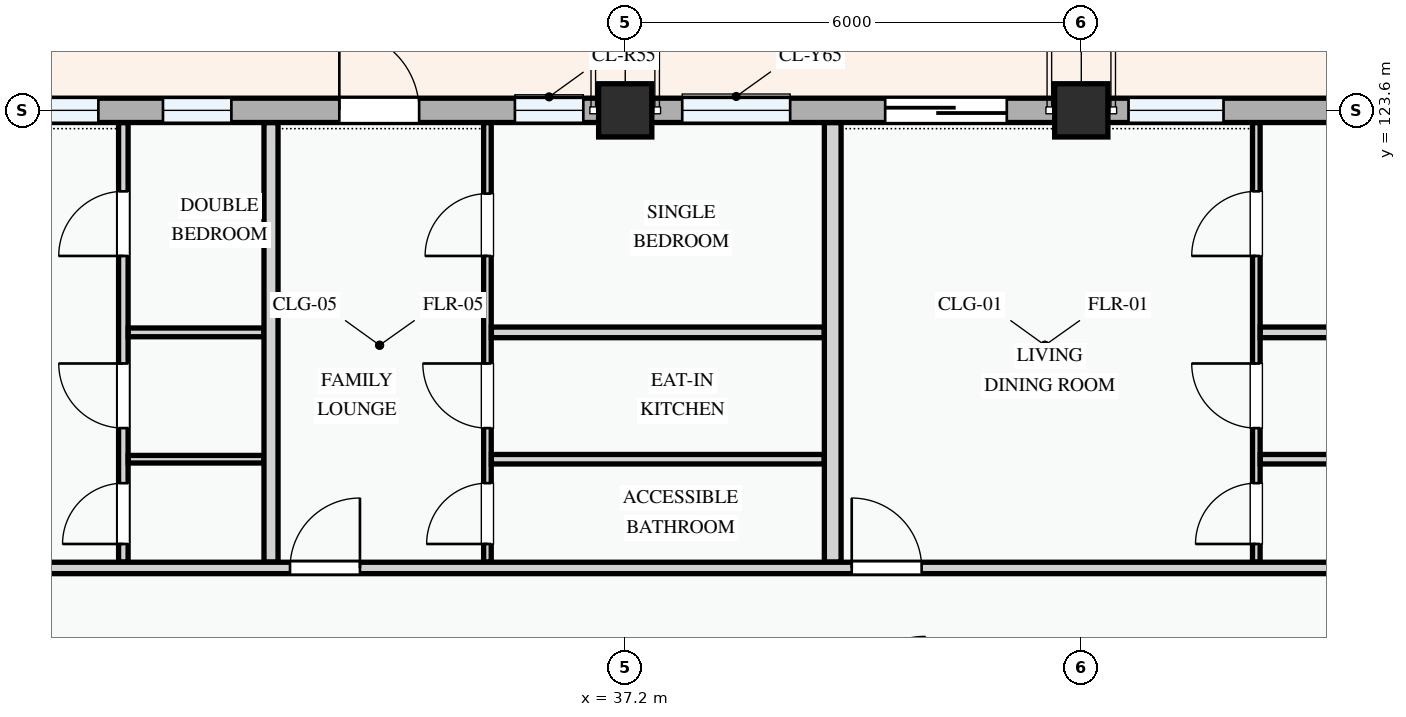
"""IFC4 building model, lengths in metres.
Left out: names, types, materials, properties, quantities, classifications, styles, units other than length and angle.
Written with IfcOpenShell. Run it as: python <this file> out.ifc"""

import sys

from ifc_helpers import new_model, si_unit, direction, frame, frame_2d, origin, origin_2d, place, context, subcontext, project, spatial, rectangle, extrude, element, fill, save


model = new_model("IFC4")
c1 = context("Model", 3, precision=1e-05, world=origin(), true_north=direction((0.0, 1.0)))
c2 = subcontext(c1, "Body", "Model", "MODEL_VIEW")
j1 = project(units=[si_unit("LENGTHUNIT", "METRE"), si_unit("PLANEANGLEUNIT", "RADIAN")], contexts=[c1])
p1 = place(None, origin())
s1 = spatial("IfcSite", under=j1, at=p1, CompositionType="ELEMENT")
p2 = place(p1, origin())
s2 = spatial("IfcBuilding", under=s1, at=p2, CompositionType="ELEMENT")
p3 = place(p2, frame((0.0, 0.0, 21.3)))
s3 = spatial("IfcBuildingStorey", under=s2, at=p3, CompositionType="ELEMENT", Elevation=21.3)
for number, where, z_axis, x_axis in (
    (1, (37.2, 123.6, 0.0), (0.0, 0.0, 1.0), (1.0, 0.0, 0.0)),
    (2, (43.2, 123.6, 0.0), (0.0, 0.0, 1.0), (1.0, 0.0, 0.0)),
):
    element("IfcColumn", number, at=place(p3, frame(where, z_axis=z_axis, x_axis=x_axis)), inside=s3, PredefinedType="COLUMN", context=c2, shape_type="SweptSolid", body=[
        extrude(rectangle(XDim=0.7, YDim=0.7, at=origin_2d()), origin(), (0.0, 0.0, 1.0), 3.3),
    ])
p4 = place(p3, frame((51.6, 123.6, 0.0), z_axis=(0.0, 0.0, 1.0), x_axis=(-1.0, 0.0, 0.0)))
e3 = element("IfcWall", 3, at=p4, inside=s3, PredefinedType="STANDARD", context=c2, shape_type="SweptSolid", body=[
    extrude(rectangle(XDim=8.4, YDim=0.32, at=frame_2d((4.2, 0.0))), origin(), (0.0, 0.0, 1.0), 2.345),
])
p5 = place(p4, frame((0.62, 0.0, 0.0)))
e4 = element("IfcOpeningElement", 4, at=p5, cuts=e3, PredefinedType="OPENING", context=c2, shape_type="SweptSolid", body=[
    extrude(rectangle(XDim=1.5, YDim=2.2, at=frame_2d((0.75, 1.1))), frame((0.0, 0.17, 0.0), z_axis=(0.0, -1.0, 0.0), x_axis=(1.0, 0.0, 0.0)), (0.0, 0.0, 1.0), 0.34),
])
p6 = place(p4, frame((3.259, 0.0, 0.78)))
e5 = element("IfcOpeningElement", 5, at=p6, cuts=e3, PredefinedType="OPENING", context=c2, shape_type="SweptSolid", body=[
    extrude(rectangle(XDim=1.75, YDim=1.45, at=frame_2d((0.875, 0.725))), frame((0.0, 0.17, 0.0), z_axis=(0.0, -1.0, 0.0), x_axis=(1.0, 0.0, 0.0)), (0.0, 0.0, 1.0), 0.34),
])
p7 = place(p4, frame((6.529, 0.0, 0.78)))
e6 = element("IfcOpeningElement", 6, at=p7, cuts=e3, PredefinedType="OPENING", context=c2, shape_type="SweptSolid", body=[
    extrude(rectangle(XDim=1.25, YDim=1.45, at=frame_2d((0.625, 0.725))), frame((0.0, 0.17, 0.0), z_axis=(0.0, -1.0, 0.0), x_axis=(1.0, 0.0, 0.0)), (0.0, 0.0, 1.0), 0.34),
])
p8 = place(p3, frame((43.2, 123.6, 0.0), z_axis=(0.0, 0.0, 1.0), x_axis=(-1.0, 0.0, 0.0)))
e7 = element("IfcWall", 7, at=p8, inside=s3, PredefinedType="STANDARD", context=c2, shape_type="SweptSolid", body=[
    extrude(rectangle(XDim=6.0, YDim=0.32, at=frame_2d((3.0, 0.0))), origin(), (0.0, 0.0, 1.0), 2.445),
])
p9 = place(p8, frame((0.98, 0.0, 0.0)))
e8 = element("IfcOpeningElement", 8, at=p9, cuts=e7, PredefinedType="OPENING", context=c2, shape_type="SweptSolid", body=[
    extrude(rectangle(XDim=1.6, YDim=2.2, at=frame_2d((0.8, 1.1))), frame((0.0, 0.17, 0.0), z_axis=(0.0, -1.0, 0.0), x_axis=(1.0, 0.0, 0.0)), (0.0, 0.0, 1.0), 0.34),
])
p10 = place(p8, frame((3.83, 0.0, 0.78)))
e9 = element("IfcOpeningElement", 9, at=p10, cuts=e7, PredefinedType="OPENING", context=c2, shape_type="SweptSolid", body=[
    extrude(rectangle(XDim=1.42, YDim=1.38, at=frame_2d((0.71, 0.69))), frame((0.0, 0.17, 0.0), z_axis=(0.0, -1.0, 0.0), x_axis=(1.0, 0.0, 0.0)), (0.0, 0.0, 1.0), 0.34),
])
p11 = place(p3, frame((37.2, 123.6, 0.0), z_axis=(0.0, 0.0, 1.0), x_axis=(-1.0, 0.0, 0.0)))
e10 = element("IfcWall", 10, at=p11, inside=s3, PredefinedType="STANDARD", context=c2, shape_type="SweptSolid", body=[
    extrude(rectangle(XDim=8.4, YDim=0.32, at=frame_2d((4.2, 0.0))), origin(), (0.0, 0.0, 1.0), 2.345),
])
p12 = place(p11, frame((2.711, 0.0, 0.0)))
e11 = element("IfcOpeningElement", 11, at=p12, cuts=e10, PredefinedType="OPENING", context=c2, shape_type="SweptSolid", body=[
    extrude(rectangle(XDim=1.05, YDim=2.15, at=frame_2d((0.525, 1.075))), frame((0.0, 0.17, 0.0), z_axis=(0.0, -1.0, 0.0), x_axis=(1.0, 0.0, 0.0)), (0.0, 0.0, 1.0), 0.34),
])
p13 = place(p11, frame((0.552, 0.0, 0.78)))
e12 = element("IfcOpeningElement", 12, at=p13, cuts=e10, PredefinedType="OPENING", context=c2, shape_type="SweptSolid", body=[
    extrude(rectangle(XDim=0.9, YDim=1.2, at=frame_2d((0.45, 0.6))), frame((0.0, 0.17, 0.0), z_axis=(0.0, -1.0, 0.0), x_axis=(1.0, 0.0, 0.0)), (0.0, 0.0, 1.0), 0.34),
])
p14 = place(p11, frame((5.181, 0.0, 0.78)))
e13 = element("IfcOpeningElement", 13, at=p14, cuts=e10, PredefinedType="OPENING", context=c2, shape_type="SweptSolid", body=[
    extrude(rectangle(XDim=0.9, YDim=1.2, at=frame_2d((0.45, 0.6))), frame((0.0, 0.17, 0.0), z_axis=(0.0, -1.0, 0.0), x_axis=(1.0, 0.0, 0.0)), (0.0, 0.0, 1.0), 0.34),
])
p15 = place(p11, frame((6.931, 0.0, 0.78)))
e14 = element("IfcOpeningElement", 14, at=p15, cuts=e10, PredefinedType="OPENING", context=c2, shape_type="SweptSolid", body=[
    extrude(rectangle(XDim=0.95, YDim=1.15, at=frame_2d((0.475, 0.575))), frame((0.0, 0.17, 0.0), z_axis=(0.0, -1.0, 0.0), x_axis=(1.0, 0.0, 0.0)), (0.0, 0.0, 1.0), 0.34),
])
p16 = place(p3, frame((30.597, 117.657, 0.0), z_axis=(0.0, 0.0, 1.0), x_axis=(0.0, 1.0, 0.0)))
e15 = element("IfcWall", 15, at=p16, inside=s3, PredefinedType="PARTITIONING", context=c2, shape_type="SweptSolid", body=[
    extrude(rectangle(XDim=5.781, YDim=0.125, at=frame_2d((2.891, 0.0))), origin(), (0.0, 0.0, 1.0), 3.0),
])
p17 = place(p16, frame((0.238, 0.0, 0.0)))
e16 = element("IfcOpeningElement", 16, at=p17, cuts=e15, PredefinedType="OPENING", context=c2, shape_type="SweptSolid", body=[
    extrude(rectangle(XDim=0.8, YDim=2.1, at=frame_2d((0.4, 1.05))), frame((0.0, 0.073, 0.0), z_axis=(0.0, -1.0, 0.0), x_axis=(1.0, 0.0, 0.0)), (0.0, 0.0, 1.0), 0.145),
])
p18 = place(p16, frame((1.763, 0.0, 0.0)))
e17 = element("IfcOpeningElement", 17, at=p18, cuts=e15, PredefinedType="OPENING", context=c2, shape_type="SweptSolid", body=[
    extrude(rectangle(XDim=0.85, YDim=2.1, at=frame_2d((0.425, 1.05))), frame((0.0, 0.073, 0.0), z_axis=(0.0, -1.0, 0.0), x_axis=(1.0, 0.0, 0.0)), (0.0, 0.0, 1.0), 0.145),
])
p19 = place(p16, frame((4.028, 0.0, 0.0)))
e18 = element("IfcOpeningElement", 18, at=p19, cuts=e15, PredefinedType="OPENING", context=c2, shape_type="SweptSolid", body=[
    extrude(rectangle(XDim=0.85, YDim=2.1, at=frame_2d((0.425, 1.05))), frame((0.0, 0.073, 0.0), z_axis=(0.0, -1.0, 0.0), x_axis=(1.0, 0.0, 0.0)), (0.0, 0.0, 1.0), 0.145),
])
p20 = place(p3, frame((30.662, 120.679, 0.0), z_axis=(0.0, 0.0, 1.0), x_axis=(1.0, 0.0, 0.0)))
e19 = element("IfcWall", 19, at=p20, inside=s3, PredefinedType="PARTITIONING", context=c2, shape_type="SweptSolid", body=[
    extrude(rectangle(XDim=1.784, YDim=0.115, at=frame_2d((0.892, 0.0))), origin(), (0.0, 0.0, 1.0), 3.0),
])
p21 = place(p3, frame((30.662, 119.01, 0.0), z_axis=(0.0, 0.0, 1.0), x_axis=(1.0, 0.0, 0.0)))
e20 = element("IfcWall", 20, at=p21, inside=s3, PredefinedType="PARTITIONING", context=c2, shape_type="SweptSolid", body=[
    extrude(rectangle(XDim=1.784, YDim=0.1, at=frame_2d((0.892, 0.0))), origin(), (0.0, 0.0, 1.0), 3.0),
])
p22 = place(p3, frame((35.387, 117.657, 0.0), z_axis=(0.0, 0.0, 1.0), x_axis=(0.0, 1.0, 0.0)))
e21 = element("IfcWall", 21, at=p22, inside=s3, PredefinedType="PARTITIONING", context=c2, shape_type="SweptSolid", body=[
    extrude(rectangle(XDim=5.781, YDim=0.1, at=frame_2d((2.891, 0.0))), origin(), (0.0, 0.0, 1.0), 3.0),
])
p23 = place(p22, frame((0.238, 0.0, 0.0)))
e22 = element("IfcOpeningElement", 22, at=p23, cuts=e21, PredefinedType="OPENING", context=c2, shape_type="SweptSolid", body=[
    extrude(rectangle(XDim=0.8, YDim=2.1, at=frame_2d((0.4, 1.05))), frame((0.0, 0.06, 0.0), z_axis=(0.0, -1.0, 0.0), x_axis=(1.0, 0.0, 0.0)), (0.0, 0.0, 1.0), 0.12),
])
p24 = place(p22, frame((1.763, 0.0, 0.0)))
e23 = element("IfcOpeningElement", 23, at=p24, cuts=e21, PredefinedType="OPENING", context=c2, shape_type="SweptSolid", body=[
    extrude(rectangle(XDim=0.85, YDim=2.1, at=frame_2d((0.425, 1.05))), frame((0.0, 0.06, 0.0), z_axis=(0.0, -1.0, 0.0), x_axis=(1.0, 0.0, 0.0)), (0.0, 0.0, 1.0), 0.12),
])
p25 = place(p22, frame((4.028, 0.0, 0.0)))
e24 = element("IfcOpeningElement", 24, at=p25, cuts=e21, PredefinedType="OPENING", context=c2, shape_type="SweptSolid", body=[
    extrude(rectangle(XDim=0.82, YDim=2.08, at=frame_2d((0.41, 1.04))), frame((0.0, 0.06, 0.0), z_axis=(0.0, -1.0, 0.0), x_axis=(1.0, 0.0, 0.0)), (0.0, 0.0, 1.0), 0.12),
])
p26 = place(p3, frame((35.439, 120.679, 0.0), z_axis=(0.0, 0.0, 1.0), x_axis=(1.0, 0.0, 0.0)))
e25 = element("IfcWall", 25, at=p26, inside=s3, PredefinedType="PARTITIONING", context=c2, shape_type="SweptSolid", body=[
    extrude(rectangle(XDim=4.379, YDim=0.14, at=frame_2d((2.189, 0.0))), origin(), (0.0, 0.0, 1.0), 3.0),
])
p27 = place(p3, frame((35.439, 119.01, 0.0), z_axis=(0.0, 0.0, 1.0), x_axis=(1.0, 0.0, 0.0)))
e26 = element("IfcWall", 26, at=p27, inside=s3, PredefinedType="PARTITIONING", context=c2, shape_type="SweptSolid", body=[
    extrude(rectangle(XDim=4.379, YDim=0.125, at=frame_2d((2.189, 0.0))), origin(), (0.0, 0.0, 1.0), 3.0),
])
p28 = place(p3, frame((32.54, 117.657, 0.0), z_axis=(0.0, 0.0, 1.0), x_axis=(0.0, 1.0, 0.0)))
e27 = element("IfcWall", 27, at=p28, inside=s3, PredefinedType="PARTITIONING", context=c2, shape_type="SweptSolid", body=[
    extrude(rectangle(XDim=5.781, YDim=0.185, at=frame_2d((2.891, 0.0))), origin(), (0.0, 0.0, 1.0), 3.0),
])
p29 = place(p3, frame((45.503, 117.657, 0.0), z_axis=(0.0, 0.0, 1.0), x_axis=(0.0, 1.0, 0.0)))
e28 = element("IfcWall", 28, at=p29, inside=s3, PredefinedType="PARTITIONING", context=c2, shape_type="SweptSolid", body=[
    extrude(rectangle(XDim=5.781, YDim=0.1, at=frame_2d((2.891, 0.0))), origin(), (0.0, 0.0, 1.0), 3.0),
])
p30 = place(p29, frame((0.238, 0.0, 0.0)))
e29 = element("IfcOpeningElement", 29, at=p30, cuts=e28, PredefinedType="OPENING", context=c2, shape_type="SweptSolid", body=[
    extrude(rectangle(XDim=0.8, YDim=2.1, at=frame_2d((0.4, 1.05))), frame((0.0, 0.06, 0.0), z_axis=(0.0, -1.0, 0.0), x_axis=(1.0, 0.0, 0.0)), (0.0, 0.0, 1.0), 0.12),
])
p31 = place(p29, frame((1.763, 0.0, 0.0)))
e30 = element("IfcOpeningElement", 30, at=p31, cuts=e28, PredefinedType="OPENING", context=c2, shape_type="SweptSolid", body=[
    extrude(rectangle(XDim=0.85, YDim=2.1, at=frame_2d((0.425, 1.05))), frame((0.0, 0.06, 0.0), z_axis=(0.0, -1.0, 0.0), x_axis=(1.0, 0.0, 0.0)), (0.0, 0.0, 1.0), 0.12),
])
p32 = place(p29, frame((4.028, 0.0, 0.0)))
e31 = element("IfcOpeningElement", 31, at=p32, cuts=e28, PredefinedType="OPENING", context=c2, shape_type="SweptSolid", body=[
    extrude(rectangle(XDim=0.85, YDim=2.1, at=frame_2d((0.425, 1.05))), frame((0.0, 0.06, 0.0), z_axis=(0.0, -1.0, 0.0), x_axis=(1.0, 0.0, 0.0)), (0.0, 0.0, 1.0), 0.12),
])
p33 = place(p3, frame((45.555, 120.679, 0.0), z_axis=(0.0, 0.0, 1.0), x_axis=(1.0, 0.0, 0.0)))
e32 = element("IfcWall", 32, at=p33, inside=s3, PredefinedType="PARTITIONING", context=c2, shape_type="SweptSolid", body=[
    extrude(rectangle(XDim=5.883, YDim=0.14, at=frame_2d((2.942, 0.0))), origin(), (0.0, 0.0, 1.0), 3.0),
])
p34 = place(p3, frame((45.555, 119.01, 0.0), z_axis=(0.0, 0.0, 1.0), x_axis=(1.0, 0.0, 0.0)))
e33 = element("IfcWall", 33, at=p34, inside=s3, PredefinedType="PARTITIONING", context=c2, shape_type="SweptSolid", body=[
    extrude(rectangle(XDim=5.883, YDim=0.125, at=frame_2d((2.942, 0.0))), origin(), (0.0, 0.0, 1.0), 3.0),
])
p35 = place(p3, frame((39.93, 117.657, 0.0), z_axis=(0.0, 0.0, 1.0), x_axis=(0.0, 1.0, 0.0)))
e34 = element("IfcWall", 34, at=p35, inside=s3, PredefinedType="PARTITIONING", context=c2, shape_type="SweptSolid", body=[
    extrude(rectangle(XDim=5.781, YDim=0.22, at=frame_2d((2.891, 0.0))), origin(), (0.0, 0.0, 1.0), 3.0),
])
p36 = place(p3, frame((22.66, 117.58, 0.0), z_axis=(0.0, 0.0, 1.0), x_axis=(1.0, 0.0, 0.0)))
e35 = element("IfcWall", 35, at=p36, inside=s3, PredefinedType="PARTITIONING", context=c2, shape_type="SweptSolid", body=[
    extrude(rectangle(XDim=28.778, YDim=0.15, at=frame_2d((14.389, 0.0))), origin(), (0.0, 0.0, 1.0), 3.0),
])
p37 = place(p36, frame((2.74, 0.0, 0.0)))
e36 = element("IfcOpeningElement", 36, at=p37, cuts=e35, PredefinedType="OPENING", context=c2, shape_type="SweptSolid", body=[
    extrude(rectangle(XDim=0.92, YDim=2.1, at=frame_2d((0.46, 1.05))), frame((0.0, 0.085, 0.0), z_axis=(0.0, -1.0, 0.0), x_axis=(1.0, 0.0, 0.0)), (0.0, 0.0, 1.0), 0.17),
])
p38 = place(p36, frame((10.13, 0.0, 0.0)))
e37 = element("IfcOpeningElement", 37, at=p38, cuts=e35, PredefinedType="OPENING", context=c2, shape_type="SweptSolid", body=[
    extrude(rectangle(XDim=0.92, YDim=2.1, at=frame_2d((0.46, 1.05))), frame((0.0, 0.085, 0.0), z_axis=(0.0, -1.0, 0.0), x_axis=(1.0, 0.0, 0.0)), (0.0, 0.0, 1.0), 0.17),
])
p39 = place(p36, frame((17.52, 0.0, 0.0)))
e38 = element("IfcOpeningElement", 38, at=p39, cuts=e35, PredefinedType="OPENING", context=c2, shape_type="SweptSolid", body=[
    extrude(rectangle(XDim=0.92, YDim=2.1, at=frame_2d((0.46, 1.05))), frame((0.0, 0.085, 0.0), z_axis=(0.0, -1.0, 0.0), x_axis=(1.0, 0.0, 0.0)), (0.0, 0.0, 1.0), 0.17),
])
p40 = place(p7, origin())
e39 = element("IfcWindow", 39, at=p40, inside=s3, PartitioningType="SINGLE_PANEL", PredefinedType="WINDOW", context=c2, shape_type="SweptSolid", body=[
    extrude(rectangle(XDim=1.25, YDim=1.45, at=frame_2d((0.625, 0.725))), frame((0.0, 0.03, 0.0), z_axis=(0.0, -1.0, 0.0), x_axis=(1.0, 0.0, 0.0)), (0.0, 0.0, 1.0), 0.06),
])
fill(e6, e39)
p41 = place(p9, frame((1.6, 0.0, 0.0), z_axis=(0.0, 0.0, 1.0), x_axis=(-1.0, 0.0, 0.0)))
e40 = element("IfcDoor", 40, at=p41, inside=s3, OperationType="SLIDING_TO_LEFT", PredefinedType="DOOR", context=c2, shape_type="SweptSolid", body=[
    extrude(rectangle(XDim=1.6, YDim=2.2, at=frame_2d((0.8, 1.1))), frame((0.0, 0.025, 0.0), z_axis=(0.0, -1.0, 0.0), x_axis=(1.0, 0.0, 0.0)), (0.0, 0.0, 1.0), 0.05),
])
fill(e8, e40)
p42 = place(p10, origin())
e41 = element("IfcWindow", 41, at=p42, inside=s3, PartitioningType="SINGLE_PANEL", PredefinedType="WINDOW", context=c2, shape_type="SweptSolid", body=[
    extrude(rectangle(XDim=1.42, YDim=1.38, at=frame_2d((0.71, 0.69))), frame((0.0, 0.03, 0.0), z_axis=(0.0, -1.0, 0.0), x_axis=(1.0, 0.0, 0.0)), (0.0, 0.0, 1.0), 0.06),
])
fill(e9, e41)
p43 = place(p12, frame((1.05, 0.0, 0.0), z_axis=(0.0, 0.0, 1.0), x_axis=(-1.0, 0.0, 0.0)))
e42 = element("IfcDoor", 42, at=p43, inside=s3, OperationType="SINGLE_SWING_LEFT", PredefinedType="DOOR", context=c2, shape_type="SweptSolid", body=[
    extrude(rectangle(XDim=1.05, YDim=2.15, at=frame_2d((0.525, 1.075))), frame((0.0, 0.025, 0.0), z_axis=(0.0, -1.0, 0.0), x_axis=(1.0, 0.0, 0.0)), (0.0, 0.0, 1.0), 0.05),
])
fill(e11, e42)
p44 = place(p13, origin())
e43 = element("IfcWindow", 43, at=p44, inside=s3, PartitioningType="SINGLE_PANEL", PredefinedType="WINDOW", context=c2, shape_type="SweptSolid", body=[
    extrude(rectangle(XDim=0.9, YDim=1.2, at=frame_2d((0.45, 0.6))), frame((0.0, 0.03, 0.0), z_axis=(0.0, -1.0, 0.0), x_axis=(1.0, 0.0, 0.0)), (0.0, 0.0, 1.0), 0.06),
])
fill(e12, e43)
p45 = place(p14, origin())
e44 = element("IfcWindow", 44, at=p45, inside=s3, PartitioningType="SINGLE_PANEL", PredefinedType="WINDOW", context=c2, shape_type="SweptSolid", body=[
    extrude(rectangle(XDim=0.9, YDim=1.2, at=frame_2d((0.45, 0.6))), frame((0.0, 0.03, 0.0), z_axis=(0.0, -1.0, 0.0), x_axis=(1.0, 0.0, 0.0)), (0.0, 0.0, 1.0), 0.06),
])
fill(e13, e44)
p46 = place(p15, origin())
e45 = element("IfcWindow", 45, at=p46, inside=s3, PartitioningType="SINGLE_PANEL", PredefinedType="WINDOW", context=c2, shape_type="SweptSolid", body=[
    extrude(rectangle(XDim=0.95, YDim=1.15, at=frame_2d((0.475, 0.575))), frame((0.0, 0.03, 0.0), z_axis=(0.0, -1.0, 0.0), x_axis=(1.0, 0.0, 0.0)), (0.0, 0.0, 1.0), 0.06),
])
fill(e14, e45)
p47 = place(p17, origin())
e46 = element("IfcDoor", 46, at=p47, inside=s3, OperationType="SINGLE_SWING_LEFT", PredefinedType="DOOR", context=c2, shape_type="SweptSolid", body=[
    extrude(rectangle(XDim=0.8, YDim=2.1, at=frame_2d((0.4, 1.05))), frame((0.0, 0.025, 0.0), z_axis=(0.0, -1.0, 0.0), x_axis=(1.0, 0.0, 0.0)), (0.0, 0.0, 1.0), 0.05),
])
fill(e16, e46)
p48 = place(p18, origin())
e47 = element("IfcDoor", 47, at=p48, inside=s3, OperationType="SINGLE_SWING_RIGHT", PredefinedType="DOOR", context=c2, shape_type="SweptSolid", body=[
    extrude(rectangle(XDim=0.85, YDim=2.1, at=frame_2d((0.425, 1.05))), frame((0.0, 0.025, 0.0), z_axis=(0.0, -1.0, 0.0), x_axis=(1.0, 0.0, 0.0)), (0.0, 0.0, 1.0), 0.05),
])
fill(e17, e47)
p49 = place(p19, origin())
e48 = element("IfcDoor", 48, at=p49, inside=s3, OperationType="SINGLE_SWING_LEFT", PredefinedType="DOOR", context=c2, shape_type="SweptSolid", body=[
    extrude(rectangle(XDim=0.85, YDim=2.1, at=frame_2d((0.425, 1.05))), frame((0.0, 0.025, 0.0), z_axis=(0.0, -1.0, 0.0), x_axis=(1.0, 0.0, 0.0)), (0.0, 0.0, 1.0), 0.05),
])
fill(e18, e48)
p50 = place(p23, origin())
e49 = element("IfcDoor", 49, at=p50, inside=s3, OperationType="SINGLE_SWING_LEFT", PredefinedType="DOOR", context=c2, shape_type="SweptSolid", body=[
    extrude(rectangle(XDim=0.8, YDim=2.1, at=frame_2d((0.4, 1.05))), frame((0.0, 0.025, 0.0), z_axis=(0.0, -1.0, 0.0), x_axis=(1.0, 0.0, 0.0)), (0.0, 0.0, 1.0), 0.05),
])
fill(e22, e49)
p51 = place(p24, origin())
e50 = element("IfcDoor", 50, at=p51, inside=s3, OperationType="SINGLE_SWING_RIGHT", PredefinedType="DOOR", context=c2, shape_type="SweptSolid", body=[
    extrude(rectangle(XDim=0.85, YDim=2.1, at=frame_2d((0.425, 1.05))), frame((0.0, 0.025, 0.0), z_axis=(0.0, -1.0, 0.0), x_axis=(1.0, 0.0, 0.0)), (0.0, 0.0, 1.0), 0.05),
])
fill(e23, e50)
p52 = place(p25, origin())
e51 = element("IfcDoor", 51, at=p52, inside=s3, OperationType="SINGLE_SWING_LEFT", PredefinedType="DOOR", context=c2, shape_type="SweptSolid", body=[
    extrude(rectangle(XDim=0.82, YDim=2.08, at=frame_2d((0.41, 1.04))), frame((0.0, 0.025, 0.0), z_axis=(0.0, -1.0, 0.0), x_axis=(1.0, 0.0, 0.0)), (0.0, 0.0, 1.0), 0.05),
])
fill(e24, e51)
p53 = place(p30, origin())
e52 = element("IfcDoor", 52, at=p53, inside=s3, OperationType="SINGLE_SWING_LEFT", PredefinedType="DOOR", context=c2, shape_type="SweptSolid", body=[
    extrude(rectangle(XDim=0.8, YDim=2.1, at=frame_2d((0.4, 1.05))), frame((0.0, 0.025, 0.0), z_axis=(0.0, -1.0, 0.0), x_axis=(1.0, 0.0, 0.0)), (0.0, 0.0, 1.0), 0.05),
])
fill(e29, e52)
p54 = place(p31, origin())
e53 = element("IfcDoor", 53, at=p54, inside=s3, OperationType="SINGLE_SWING_RIGHT", PredefinedType="DOOR", context=c2, shape_type="SweptSolid", body=[
    extrude(rectangle(XDim=0.85, YDim=2.1, at=frame_2d((0.425, 1.05))), frame((0.0, 0.025, 0.0), z_axis=(0.0, -1.0, 0.0), x_axis=(1.0, 0.0, 0.0)), (0.0, 0.0, 1.0), 0.05),
])
fill(e30, e53)
p55 = place(p32, origin())
e54 = element("IfcDoor", 54, at=p55, inside=s3, OperationType="SINGLE_SWING_LEFT", PredefinedType="DOOR", context=c2, shape_type="SweptSolid", body=[
    extrude(rectangle(XDim=0.85, YDim=2.1, at=frame_2d((0.425, 1.05))), frame((0.0, 0.025, 0.0), z_axis=(0.0, -1.0, 0.0), x_axis=(1.0, 0.0, 0.0)), (0.0, 0.0, 1.0), 0.05),
])
fill(e31, e54)
p56 = place(p38, origin())
e55 = element("IfcDoor", 55, at=p56, inside=s3, OperationType="SINGLE_SWING_RIGHT", PredefinedType="DOOR", context=c2, shape_type="SweptSolid", body=[
    extrude(rectangle(XDim=0.92, YDim=2.1, at=frame_2d((0.46, 1.05))), frame((0.0, 0.025, 0.0), z_axis=(0.0, -1.0, 0.0), x_axis=(1.0, 0.0, 0.0)), (0.0, 0.0, 1.0), 0.05),
])
fill(e37, e55)
p57 = place(p39, origin())
e56 = element("IfcDoor", 56, at=p57, inside=s3, OperationType="SINGLE_SWING_LEFT", PredefinedType="DOOR", context=c2, shape_type="SweptSolid", body=[
    extrude(rectangle(XDim=0.92, YDim=2.1, at=frame_2d((0.46, 1.05))), frame((0.0, 0.025, 0.0), z_axis=(0.0, -1.0, 0.0), x_axis=(1.0, 0.0, 0.0)), (0.0, 0.0, 1.0), 0.05),
])
fill(e38, e56)
save(model, sys.argv[1])
